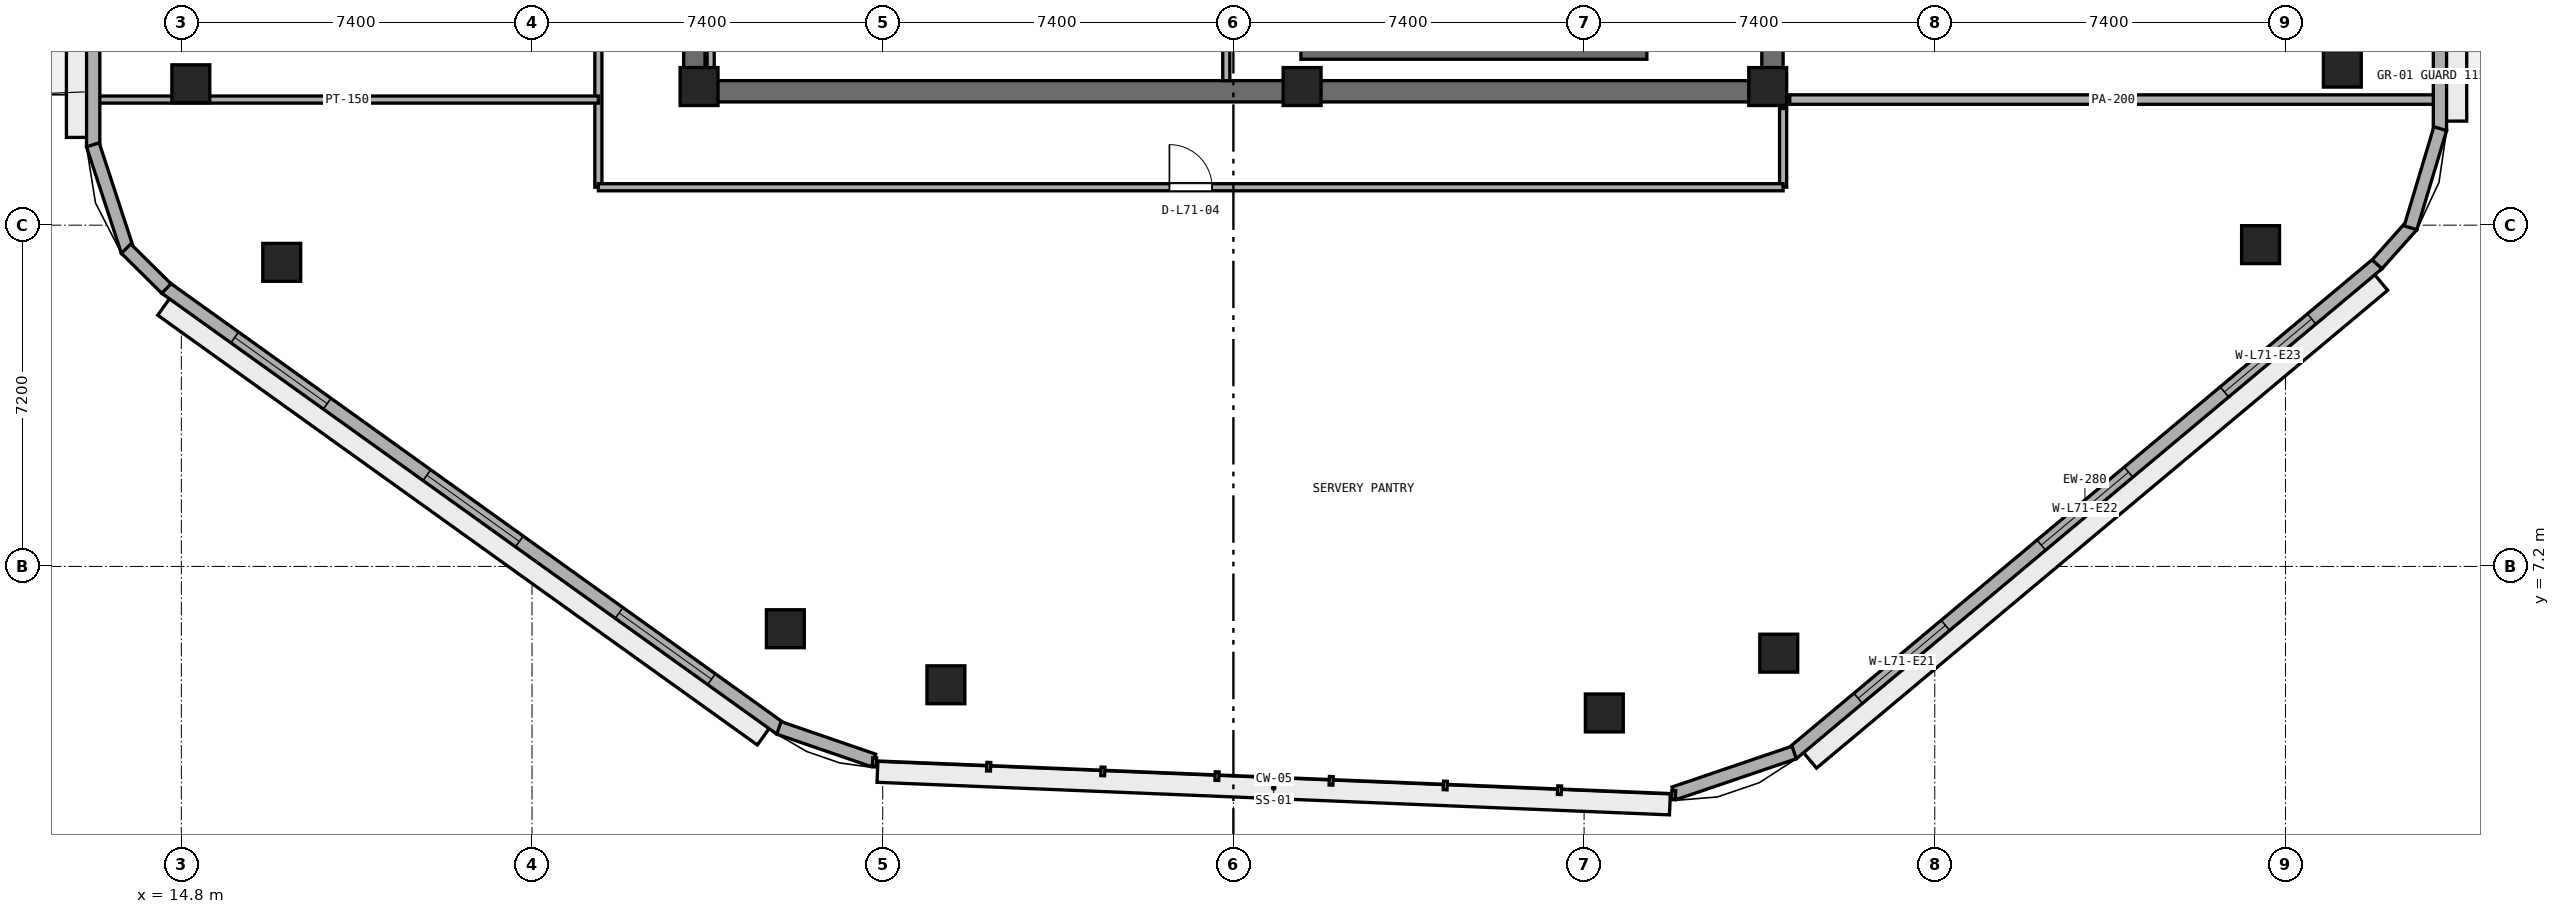
"""IFC4 building model, lengths in metres.
Left out: names, types, materials, properties, quantities, classifications, styles, units other than length and angle.
Written with IfcOpenShell. Run it as: python <this file> out.ifc"""

import sys

from ifc_helpers import new_model, si_unit, direction, frame, frame_2d, origin, origin_2d, place, context, subcontext, project, spatial, rectangle, extrude, element, fill, save


model = new_model("IFC4")
c1 = context("Model", 3, precision=1e-05, world=origin(), true_north=direction((0.0, 1.0)))
c2 = subcontext(c1, "Body", "Model", "MODEL_VIEW")
j1 = project(units=[si_unit("LENGTHUNIT", "METRE"), si_unit("PLANEANGLEUNIT", "RADIAN")], contexts=[c1])
p1 = place(None, origin())
s1 = spatial("IfcSite", under=j1, at=p1, CompositionType="ELEMENT")
p2 = place(p1, origin())
s2 = spatial("IfcBuilding", under=s1, at=p2, CompositionType="ELEMENT")
p3 = place(p2, frame((0.0, 0.0, 278.2)))
s3 = spatial("IfcBuildingStorey", under=s2, at=p3, CompositionType="ELEMENT", Elevation=278.2)
p4 = place(p3, frame((25.4, 17.225, 0.0), z_axis=(0.0, 0.0, 1.0), x_axis=(1.0, 0.0, 0.0)))
e1 = element("IfcWall", 1, at=p4, inside=s3, PredefinedType="SHEAR", context=c2, shape_type="SweptSolid", body=[
    extrude(rectangle(XDim=23.2, YDim=0.45, at=frame_2d((11.6, 0.0))), origin(), (0.0, 0.0, 1.0), 3.54),
])
p5 = place(p3, frame((25.625, 17.45, 0.0), z_axis=(0.0, 0.0, 1.0), x_axis=(0.0, 1.0, 0.0)))
e2 = element("IfcWall", 2, at=p5, inside=s3, PredefinedType="SHEAR", context=c2, shape_type="SweptSolid", body=[
    extrude(rectangle(XDim=15.5, YDim=0.45, at=frame_2d((7.75, 0.0))), origin(), (0.0, 0.0, 1.0), 3.54),
])
p6 = place(p5, frame((7.0, 0.0, 0.0)))
e3 = element("IfcOpeningElement", 3, at=p6, cuts=e2, PredefinedType="OPENING", context=c2, shape_type="SweptSolid", body=[
    extrude(rectangle(XDim=1.5, YDim=2.15, at=frame_2d((0.75, 1.075))), frame((0.0, 0.235, 0.0), z_axis=(0.0, -1.0, 0.0), x_axis=(1.0, 0.0, 0.0)), (0.0, 0.0, 1.0), 0.47),
])
p7 = place(p3, frame((48.375, 17.45, 0.0), z_axis=(0.0, 0.0, 1.0), x_axis=(0.0, 1.0, 0.0)))
e4 = element("IfcWall", 4, at=p7, inside=s3, PredefinedType="SHEAR", context=c2, shape_type="SweptSolid", body=[
    extrude(rectangle(XDim=15.5, YDim=0.45, at=frame_2d((7.75, 0.0))), origin(), (0.0, 0.0, 1.0), 3.54),
])
p8 = place(p7, frame((5.85, 0.0, 0.0)))
e5 = element("IfcOpeningElement", 5, at=p8, cuts=e4, PredefinedType="OPENING", context=c2, shape_type="SweptSolid", body=[
    extrude(rectangle(XDim=1.5, YDim=2.15, at=frame_2d((0.75, 1.075))), frame((0.0, 0.235, 0.0), z_axis=(0.0, -1.0, 0.0), x_axis=(1.0, 0.0, 0.0)), (0.0, 0.0, 1.0), 0.47),
])
for number, where, z_axis, x_axis in (
    (6, (25.725, 17.325, 0.0), (0.0, 0.0, 1.0), (1.0, 0.0, 0.0)),
    (7, (38.45, 17.325, 0.0), (0.0, 0.0, 1.0), (1.0, 0.0, 0.0)),
    (8, (48.275, 17.325, 0.0), (0.0, 0.0, 1.0), (1.0, 0.0, 0.0)),
):
    element("IfcColumn", number, at=place(p3, frame(where, z_axis=z_axis, x_axis=x_axis)), inside=s3, PredefinedType="PILASTER", context=c2, shape_type="SweptSolid", body=[
        extrude(rectangle(XDim=0.8, YDim=0.8, at=origin_2d()), origin(), (0.0, 0.0, 1.0), 3.8),
    ])
for number, where, z_axis, x_axis in (
    (9, (30.934, 4.703, 0.0), (0.0, 0.0, 1.0), (1.0, 0.0, 0.0)),
    (10, (44.827, 4.108, 0.0), (0.0, 0.0, 1.0), (1.0, 0.0, 0.0)),
    (11, (48.508, 5.37, 0.0), (0.0, 0.0, 1.0), (1.0, 0.0, 0.0)),
    (12, (58.675, 13.989, 0.0), (0.0, 0.0, 1.0), (1.0, 0.0, 0.0)),
    (13, (60.4, 17.714, 0.0), (0.0, 0.0, 1.0), (1.0, 0.0, 0.0)),
    (14, (15.0, 17.383, 0.0), (0.0, 0.0, 1.0), (1.0, 0.0, 0.0)),
    (15, (16.918, 13.616, 0.0), (0.0, 0.0, 1.0), (1.0, 0.0, 0.0)),
    (16, (27.545, 5.886, 0.0), (0.0, 0.0, 1.0), (1.0, 0.0, 0.0)),
):
    element("IfcColumn", number, at=place(p3, frame(where, z_axis=z_axis, x_axis=x_axis)), inside=s3, PredefinedType="COLUMN", context=c2, shape_type="SweptSolid", body=[
        extrude(rectangle(XDim=0.8, YDim=0.8, at=origin_2d()), origin(), (0.0, 0.0, 1.0), 3.8),
    ])
p9 = place(p3, frame((38.425, 18.025, 0.0), z_axis=(0.0, 0.0, 1.0), x_axis=(1.0, 0.0, 0.0)))
e17 = element("IfcWall", 17, at=p9, inside=s3, PredefinedType="SHEAR", context=c2, shape_type="SweptSolid", body=[
    extrude(rectangle(XDim=7.3, YDim=0.25, at=frame_2d((3.65, 0.0))), origin(), (0.0, 0.0, 1.0), 3.54),
])
p10 = place(p3, frame((25.97, 17.45, 0.0), z_axis=(0.0, 0.0, 1.0), x_axis=(0.0, 1.0, 0.0)))
e18 = element("IfcWall", 18, at=p10, inside=s3, PredefinedType="PARTITIONING", context=c2, shape_type="SweptSolid", body=[
    extrude(rectangle(XDim=2.3, YDim=0.15, at=frame_2d((1.15, 0.0))), origin(), (0.0, 0.0, 1.0), 2.64),
])
p11 = place(p3, frame((36.85, 17.45, 0.0), z_axis=(0.0, 0.0, 1.0), x_axis=(0.0, 1.0, 0.0)))
e19 = element("IfcWall", 19, at=p11, inside=s3, PredefinedType="PARTITIONING", context=c2, shape_type="SweptSolid", body=[
    extrude(rectangle(XDim=2.3, YDim=0.15, at=frame_2d((1.15, 0.0))), origin(), (0.0, 0.0, 1.0), 3.54),
])
p12 = place(p3, frame((48.6, 15.2, 0.0), z_axis=(0.0, 0.0, 1.0), x_axis=(0.0, 1.0, 0.0)))
e20 = element("IfcWall", 20, at=p12, inside=s3, PredefinedType="PARTITIONING", context=c2, shape_type="SweptSolid", body=[
    extrude(rectangle(XDim=1.66, YDim=0.15, at=frame_2d((0.83, 0.0))), origin(), (0.0, 0.0, 1.0), 3.54),
])
p13 = place(p3, frame((23.6, 15.2, 0.0), z_axis=(0.0, 0.0, 1.0), x_axis=(0.0, 1.0, 0.0)))
e21 = element("IfcWall", 21, at=p13, inside=s3, PredefinedType="PARTITIONING", context=c2, shape_type="SweptSolid", body=[
    extrude(rectangle(XDim=20.0, YDim=0.15, at=frame_2d((10.0, 0.0))), origin(), (0.0, 0.0, 1.0), 3.54),
])
p14 = place(p13, frame((9.55, 0.0, 0.0)))
e22 = element("IfcOpeningElement", 22, at=p14, cuts=e21, PredefinedType="OPENING", context=c2, shape_type="SweptSolid", body=[
    extrude(rectangle(XDim=0.9, YDim=2.1, at=frame_2d((0.45, 1.05))), frame((0.0, 0.085, 0.0), z_axis=(0.0, -1.0, 0.0), x_axis=(1.0, 0.0, 0.0)), (0.0, 0.0, 1.0), 0.17),
])
p15 = place(p3, frame((23.6, 15.2, 0.0), z_axis=(0.0, 0.0, 1.0), x_axis=(1.0, 0.0, 0.0)))
e23 = element("IfcWall", 23, at=p15, inside=s3, PredefinedType="PARTITIONING", context=c2, shape_type="SweptSolid", body=[
    extrude(rectangle(XDim=25.0, YDim=0.15, at=frame_2d((12.5, 0.0))), origin(), (0.0, 0.0, 1.0), 3.54),
])
p16 = place(p15, frame((12.05, 0.0, 0.0)))
e24 = element("IfcOpeningElement", 24, at=p16, cuts=e23, PredefinedType="OPENING", context=c2, shape_type="SweptSolid", body=[
    extrude(rectangle(XDim=0.9, YDim=2.1, at=frame_2d((0.45, 1.05))), frame((0.0, 0.085, 0.0), z_axis=(0.0, -1.0, 0.0), x_axis=(1.0, 0.0, 0.0)), (0.0, 0.0, 1.0), 0.17),
])
p17 = place(p3, frame((13.005, 17.05, 0.0), z_axis=(0.0, 0.0, 1.0), x_axis=(1.0, 0.0, 0.0)))
e25 = element("IfcWall", 25, at=p17, inside=s3, PredefinedType="PARTITIONING", context=c2, shape_type="SweptSolid", body=[
    extrude(rectangle(XDim=10.595, YDim=0.15, at=frame_2d((5.298, 0.0))), origin(), (0.0, 0.0, 1.0), 3.54),
])
p18 = place(p3, frame((48.74, 17.05, 0.0), z_axis=(0.0, 0.0, 1.0), x_axis=(1.0, 0.0, 0.0)))
e26 = element("IfcWall", 26, at=p18, inside=s3, PredefinedType="PARTITIONING", context=c2, shape_type="SweptSolid", body=[
    extrude(rectangle(XDim=13.655, YDim=0.2, at=frame_2d((6.828, 0.0))), origin(), (0.0, 0.0, 1.0), 2.923),
])
p19 = place(p3, frame((48.789, 3.25, 0.0), z_axis=(0.0, 0.0, 1.0), x_axis=(0.767032672101, 0.641608042288, 0.0)))
e27 = element("IfcWall", 27, at=p19, inside=s3, PredefinedType="STANDARD", context=c2, shape_type="SweptSolid", body=[
    extrude(rectangle(XDim=16.113, YDim=0.28, at=frame_2d((8.057, 0.0))), origin(), (0.0, 0.0, 1.0), 3.54),
])
p20 = place(p19, frame((1.819, 0.0, 0.9)))
e28 = element("IfcOpeningElement", 28, at=p20, cuts=e27, PredefinedType="OPENING", context=c2, shape_type="SweptSolid", body=[
    extrude(rectangle(XDim=2.4, YDim=1.75, at=frame_2d((1.2, 0.875))), frame((0.0, 0.15, 0.0), z_axis=(0.0, -1.0, 0.0), x_axis=(1.0, 0.0, 0.0)), (0.0, 0.0, 1.0), 0.3),
])
p21 = place(p19, frame((6.857, 0.0, 0.9)))
e29 = element("IfcOpeningElement", 29, at=p21, cuts=e27, PredefinedType="OPENING", context=c2, shape_type="SweptSolid", body=[
    extrude(rectangle(XDim=2.4, YDim=1.75, at=frame_2d((1.2, 0.875))), frame((0.0, 0.15, 0.0), z_axis=(0.0, -1.0, 0.0), x_axis=(1.0, 0.0, 0.0)), (0.0, 0.0, 1.0), 0.3),
])
p22 = place(p19, frame((11.895, 0.0, 0.9)))
e30 = element("IfcOpeningElement", 30, at=p22, cuts=e27, PredefinedType="OPENING", context=c2, shape_type="SweptSolid", body=[
    extrude(rectangle(XDim=2.4, YDim=1.75, at=frame_2d((1.2, 0.875))), frame((0.0, 0.15, 0.0), z_axis=(0.0, -1.0, 0.0), x_axis=(1.0, 0.0, 0.0)), (0.0, 0.0, 1.0), 0.3),
])
p23 = place(p3, frame((62.46, 16.396, 0.0), z_axis=(0.0, 0.0, 1.0), x_axis=(0.0, 1.0, 0.0)))
e31 = element("IfcWall", 31, at=p23, inside=s3, PredefinedType="STANDARD", context=c2, shape_type="SweptSolid", body=[
    extrude(rectangle(XDim=18.854, YDim=0.28, at=frame_2d((9.427, 0.0))), origin(), (0.0, 0.0, 1.0), 3.54),
])
p24 = place(p23, frame((8.877, 0.0, 0.0)))
e32 = element("IfcOpeningElement", 32, at=p24, cuts=e31, PredefinedType="OPENING", context=c2, shape_type="SweptSolid", body=[
    extrude(rectangle(XDim=1.1, YDim=2.2, at=frame_2d((0.55, 1.1))), frame((0.0, 0.15, 0.0), z_axis=(0.0, -1.0, 0.0), x_axis=(1.0, 0.0, 0.0)), (0.0, 0.0, 1.0), 0.3),
])
p25 = place(p23, frame((2.276, 0.0, 0.9)))
e33 = element("IfcOpeningElement", 33, at=p25, cuts=e31, PredefinedType="OPENING", context=c2, shape_type="SweptSolid", body=[
    extrude(rectangle(XDim=2.4, YDim=1.75, at=frame_2d((1.2, 0.875))), frame((0.0, 0.15, 0.0), z_axis=(0.0, -1.0, 0.0), x_axis=(1.0, 0.0, 0.0)), (0.0, 0.0, 1.0), 0.3),
])
p26 = place(p23, frame((14.179, 0.0, 0.9)))
e34 = element("IfcOpeningElement", 34, at=p26, cuts=e31, PredefinedType="OPENING", context=c2, shape_type="SweptSolid", body=[
    extrude(rectangle(XDim=2.4, YDim=1.75, at=frame_2d((1.2, 0.875))), frame((0.0, 0.15, 0.0), z_axis=(0.0, -1.0, 0.0), x_axis=(1.0, 0.0, 0.0)), (0.0, 0.0, 1.0), 0.3),
])
p27 = place(p3, frame((12.94, 33.548, 0.0), z_axis=(0.0, 0.0, 1.0), x_axis=(0.0, -1.0, 0.0)))
e35 = element("IfcWall", 35, at=p27, inside=s3, PredefinedType="STANDARD", context=c2, shape_type="SweptSolid", body=[
    extrude(rectangle(XDim=17.496, YDim=0.28, at=frame_2d((8.748, 0.0))), origin(), (0.0, 0.0, 1.0), 3.54),
])
p28 = place(p27, frame((8.198, 0.0, 0.0)))
e36 = element("IfcOpeningElement", 36, at=p28, cuts=e35, PredefinedType="OPENING", context=c2, shape_type="SweptSolid", body=[
    extrude(rectangle(XDim=1.1, YDim=2.2, at=frame_2d((0.55, 1.1))), frame((0.0, 0.15, 0.0), z_axis=(0.0, -1.0, 0.0), x_axis=(1.0, 0.0, 0.0)), (0.0, 0.0, 1.0), 0.3),
])
p29 = place(p27, frame((2.049, 0.0, 0.9)))
e37 = element("IfcOpeningElement", 37, at=p29, cuts=e35, PredefinedType="OPENING", context=c2, shape_type="SweptSolid", body=[
    extrude(rectangle(XDim=2.4, YDim=1.75, at=frame_2d((1.2, 0.875))), frame((0.0, 0.15, 0.0), z_axis=(0.0, -1.0, 0.0), x_axis=(1.0, 0.0, 0.0)), (0.0, 0.0, 1.0), 0.3),
])
p30 = place(p27, frame((13.047, 0.0, 0.9)))
e38 = element("IfcOpeningElement", 38, at=p30, cuts=e35, PredefinedType="OPENING", context=c2, shape_type="SweptSolid", body=[
    extrude(rectangle(XDim=2.4, YDim=1.75, at=frame_2d((1.2, 0.875))), frame((0.0, 0.15, 0.0), z_axis=(0.0, -1.0, 0.0), x_axis=(1.0, 0.0, 0.0)), (0.0, 0.0, 1.0), 0.3),
])
p31 = place(p3, frame((14.468, 13.077, 0.0), z_axis=(0.0, 0.0, 1.0), x_axis=(0.812809888039, -0.582529042972, 0.0)))
e39 = element("IfcWall", 39, at=p31, inside=s3, PredefinedType="STANDARD", context=c2, shape_type="SweptSolid", body=[
    extrude(rectangle(XDim=15.968, YDim=0.28, at=frame_2d((7.984, 0.0))), origin(), (0.0, 0.0, 1.0), 3.54),
])
p32 = place(p31, frame((1.795, 0.0, 0.9)))
e40 = element("IfcOpeningElement", 40, at=p32, cuts=e39, PredefinedType="OPENING", context=c2, shape_type="SweptSolid", body=[
    extrude(rectangle(XDim=2.4, YDim=1.75, at=frame_2d((1.2, 0.875))), frame((0.0, 0.15, 0.0), z_axis=(0.0, -1.0, 0.0), x_axis=(1.0, 0.0, 0.0)), (0.0, 0.0, 1.0), 0.3),
])
p33 = place(p31, frame((6.784, 0.0, 0.9)))
e41 = element("IfcOpeningElement", 41, at=p33, cuts=e39, PredefinedType="OPENING", context=c2, shape_type="SweptSolid", body=[
    extrude(rectangle(XDim=2.4, YDim=1.75, at=frame_2d((1.2, 0.875))), frame((0.0, 0.15, 0.0), z_axis=(0.0, -1.0, 0.0), x_axis=(1.0, 0.0, 0.0)), (0.0, 0.0, 1.0), 0.3),
])
p34 = place(p31, frame((11.773, 0.0, 0.9)))
e42 = element("IfcOpeningElement", 42, at=p34, cuts=e39, PredefinedType="OPENING", context=c2, shape_type="SweptSolid", body=[
    extrude(rectangle(XDim=2.4, YDim=1.75, at=frame_2d((1.2, 0.875))), frame((0.0, 0.15, 0.0), z_axis=(0.0, -1.0, 0.0), x_axis=(1.0, 0.0, 0.0)), (0.0, 0.0, 1.0), 0.3),
])
p35 = place(p3, frame((46.301, 2.414, 0.0), z_axis=(0.0, 0.0, 1.0), x_axis=(0.946767737654, 0.321917459819, 0.0)))
e43 = element("IfcWall", 43, at=p35, inside=s3, PredefinedType="STANDARD", context=c2, shape_type="SweptSolid", body=[
    extrude(rectangle(XDim=2.675, YDim=0.28, at=frame_2d((1.337, 0.0))), origin(), (0.0, 0.0, 1.0), 3.54),
])
p36 = place(p3, frame((61.134, 13.574, 0.0), z_axis=(0.0, 0.0, 1.0), x_axis=(0.665804679247, 0.74612608123, 0.0)))
e44 = element("IfcWall", 44, at=p36, inside=s3, PredefinedType="STANDARD", context=c2, shape_type="SweptSolid", body=[
    extrude(rectangle(XDim=1.103, YDim=0.28, at=frame_2d((0.552, 0.0))), origin(), (0.0, 0.0, 1.0), 3.54),
])
p37 = place(p3, frame((61.839, 14.344, 0.0), z_axis=(0.0, 0.0, 1.0), x_axis=(0.287235049694, 0.957860128739, 0.0)))
e45 = element("IfcWall", 45, at=p37, inside=s3, PredefinedType="STANDARD", context=c2, shape_type="SweptSolid", body=[
    extrude(rectangle(XDim=2.184, YDim=0.28, at=frame_2d((1.092, 0.0))), origin(), (0.0, 0.0, 1.0), 3.54),
])
p38 = place(p3, frame((12.933, 16.095, 0.0), z_axis=(0.0, 0.0, 1.0), x_axis=(0.3110492363, -0.950393798695, 0.0)))
e46 = element("IfcWall", 46, at=p38, inside=s3, PredefinedType="STANDARD", context=c2, shape_type="SweptSolid", body=[
    extrude(rectangle(XDim=2.364, YDim=0.28, at=frame_2d((1.182, 0.0))), origin(), (0.0, 0.0, 1.0), 3.54),
])
p39 = place(p3, frame((13.634, 13.904, 0.0), z_axis=(0.0, 0.0, 1.0), x_axis=(0.710971221429, -0.703221104845, 0.0)))
e47 = element("IfcWall", 47, at=p39, inside=s3, PredefinedType="STANDARD", context=c2, shape_type="SweptSolid", body=[
    extrude(rectangle(XDim=1.197, YDim=0.28, at=frame_2d((0.599, 0.0))), origin(), (0.0, 0.0, 1.0), 3.54),
])
p40 = place(p3, frame((27.411, 3.794, 0.0), z_axis=(0.0, 0.0, 1.0), x_axis=(0.945562091627, -0.325441747289, 0.0)))
e48 = element("IfcWall", 48, at=p40, inside=s3, PredefinedType="STANDARD", context=c2, shape_type="SweptSolid", body=[
    extrude(rectangle(XDim=2.111, YDim=0.28, at=frame_2d((1.056, 0.0))), origin(), (0.0, 0.0, 1.0), 3.54),
])
p41 = place(p16, origin())
e49 = element("IfcDoor", 49, at=p41, inside=s3, OperationType="SINGLE_SWING_LEFT", PredefinedType="DOOR", context=c2, shape_type="SweptSolid", body=[
    extrude(rectangle(XDim=0.9, YDim=2.1, at=frame_2d((0.45, 1.05))), frame((0.0, 0.025, 0.0), z_axis=(0.0, -1.0, 0.0), x_axis=(1.0, 0.0, 0.0)), (0.0, 0.0, 1.0), 0.05),
])
fill(e24, e49)
p42 = place(p20, origin())
e50 = element("IfcWindow", 50, at=p42, inside=s3, PartitioningType="SINGLE_PANEL", PredefinedType="WINDOW", context=c2, shape_type="SweptSolid", body=[
    extrude(rectangle(XDim=2.4, YDim=1.75, at=frame_2d((1.2, 0.875))), frame((0.0, 0.03, 0.0), z_axis=(0.0, -1.0, 0.0), x_axis=(1.0, 0.0, 0.0)), (0.0, 0.0, 1.0), 0.06),
])
fill(e28, e50)
p43 = place(p21, origin())
e51 = element("IfcWindow", 51, at=p43, inside=s3, PartitioningType="SINGLE_PANEL", PredefinedType="WINDOW", context=c2, shape_type="SweptSolid", body=[
    extrude(rectangle(XDim=2.4, YDim=1.75, at=frame_2d((1.2, 0.875))), frame((0.0, 0.03, 0.0), z_axis=(0.0, -1.0, 0.0), x_axis=(1.0, 0.0, 0.0)), (0.0, 0.0, 1.0), 0.06),
])
fill(e29, e51)
p44 = place(p22, origin())
e52 = element("IfcWindow", 52, at=p44, inside=s3, PartitioningType="SINGLE_PANEL", PredefinedType="WINDOW", context=c2, shape_type="SweptSolid", body=[
    extrude(rectangle(XDim=2.4, YDim=1.75, at=frame_2d((1.2, 0.875))), frame((0.0, 0.03, 0.0), z_axis=(0.0, -1.0, 0.0), x_axis=(1.0, 0.0, 0.0)), (0.0, 0.0, 1.0), 0.06),
])
fill(e30, e52)
p45 = place(p32, origin())
e53 = element("IfcWindow", 53, at=p45, inside=s3, PartitioningType="SINGLE_PANEL", PredefinedType="WINDOW", context=c2, shape_type="SweptSolid", body=[
    extrude(rectangle(XDim=2.4, YDim=1.75, at=frame_2d((1.2, 0.875))), frame((0.0, 0.03, 0.0), z_axis=(0.0, -1.0, 0.0), x_axis=(1.0, 0.0, 0.0)), (0.0, 0.0, 1.0), 0.06),
])
fill(e40, e53)
p46 = place(p33, origin())
e54 = element("IfcWindow", 54, at=p46, inside=s3, PartitioningType="SINGLE_PANEL", PredefinedType="WINDOW", context=c2, shape_type="SweptSolid", body=[
    extrude(rectangle(XDim=2.4, YDim=1.75, at=frame_2d((1.2, 0.875))), frame((0.0, 0.03, 0.0), z_axis=(0.0, -1.0, 0.0), x_axis=(1.0, 0.0, 0.0)), (0.0, 0.0, 1.0), 0.06),
])
fill(e41, e54)
p47 = place(p34, origin())
e55 = element("IfcWindow", 55, at=p47, inside=s3, PartitioningType="SINGLE_PANEL", PredefinedType="WINDOW", context=c2, shape_type="SweptSolid", body=[
    extrude(rectangle(XDim=2.4, YDim=1.75, at=frame_2d((1.2, 0.875))), frame((0.0, 0.03, 0.0), z_axis=(0.0, -1.0, 0.0), x_axis=(1.0, 0.0, 0.0)), (0.0, 0.0, 1.0), 0.06),
])
fill(e42, e55)
save(model, sys.argv[1])
